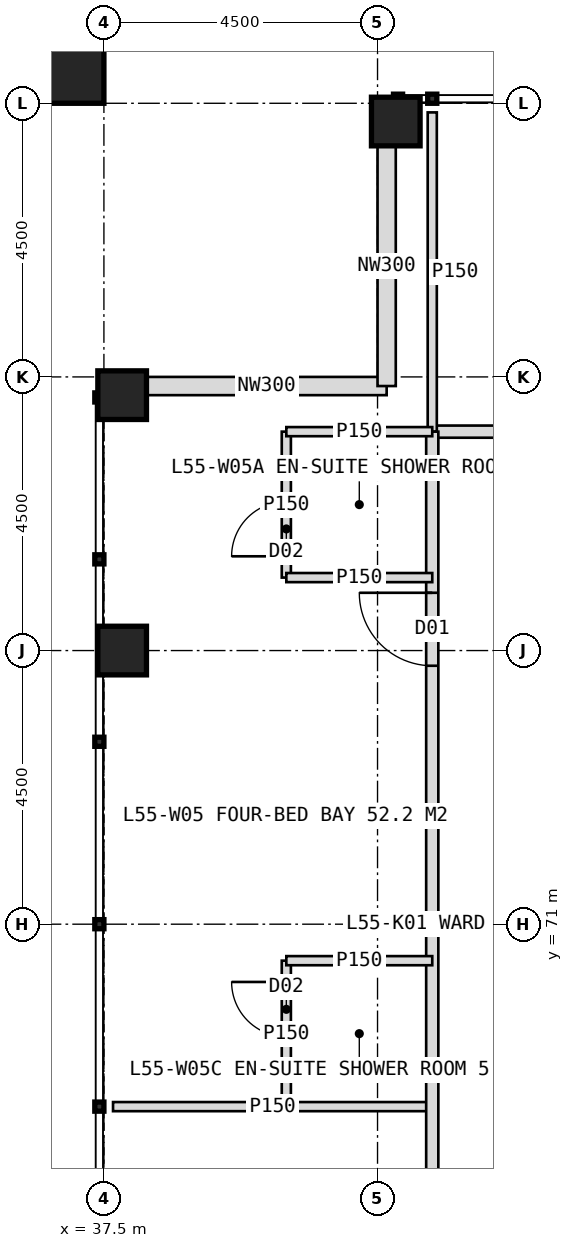
"""IFC4 building model, lengths in metres.
Left out: names, types, materials, properties, quantities, classifications, styles, units other than length and angle.
Written with IfcOpenShell. Run it as: python <this file> out.ifc"""

import sys

from ifc_helpers import new_model, si_unit, direction, frame, frame_2d, origin, origin_2d, place, context, subcontext, project, spatial, rectangle, hollow_rectangle, extrude, element, fill, save


model = new_model("IFC4")
c1 = context("Model", 3, precision=1e-05, world=origin(), true_north=direction((0.0, 1.0)))
c2 = subcontext(c1, "Body", "Model", "MODEL_VIEW")
j1 = project(units=[si_unit("LENGTHUNIT", "METRE"), si_unit("PLANEANGLEUNIT", "RADIAN")], contexts=[c1])
p1 = place(None, origin())
s1 = spatial("IfcSite", under=j1, at=p1, CompositionType="ELEMENT")
p2 = place(p1, origin())
s2 = spatial("IfcBuilding", under=s1, at=p2, CompositionType="ELEMENT")
p3 = place(p2, frame((0.0, 0.0, 229.0)))
s3 = spatial("IfcBuildingStorey", under=s2, at=p3, CompositionType="ELEMENT", Elevation=229.0)
for number, where, z_axis, x_axis in (
    (1, (42.3, 84.2, 0.0), (0.0, 0.0, 1.0), (1.0, 0.0, 0.0)),
    (2, (37.8, 75.5, 0.0), (0.0, 0.0, 1.0), (1.0, 0.0, 0.0)),
    (3, (37.8, 79.7, 0.0), (0.0, 0.0, 1.0), (1.0, 0.0, 0.0)),
):
    element("IfcColumn", number, at=place(p3, frame(where, z_axis=z_axis, x_axis=x_axis)), inside=s3, PredefinedType="COLUMN", context=c2, shape_type="SweptSolid", body=[
        extrude(hollow_rectangle(XDim=0.8, YDim=0.8, WallThickness=0.08, at=origin_2d()), origin(), (0.0, 0.0, 1.0), 4.0),
    ])
p4 = place(p3, frame((36.9, 85.1, 0.0), z_axis=(0.0, 0.0, 1.0), x_axis=(1.0, 0.0, 0.0)))
e4 = element("IfcColumn", 4, at=p4, inside=s3, PredefinedType="COLUMN", context=c2, shape_type="SweptSolid", body=[
    extrude(hollow_rectangle(XDim=1.2, YDim=1.2, WallThickness=0.07, at=origin_2d()), origin(), (0.0, 0.0, 1.0), 4.0),
])
for number, where, z_axis, x_axis in (
    (5, (38.2, 79.85, 0.0), (0.0, 0.0, 1.0), (1.0, 0.0, 0.0)),
    (6, (42.15, 79.85, 0.0), (0.0, 0.0, 1.0), (0.0, 1.0, 0.0)),
):
    element("IfcWall", number, at=place(p3, frame(where, z_axis=z_axis, x_axis=x_axis)), inside=s3, PredefinedType="ELEMENTEDWALL", context=c2, shape_type="SweptSolid", body=[
        extrude(rectangle(XDim=3.95, YDim=0.3, at=frame_2d((1.975, 0.0))), origin(), (0.0, 0.0, 1.0), 2.85),
    ])
p5 = place(p3, frame((42.9, 79.1, 0.0), z_axis=(0.0, 0.0, 1.0), x_axis=(1.0, 0.0, 0.0)))
e7 = element("IfcWall", 7, at=p5, inside=s3, PredefinedType="PARTITIONING", context=c2, shape_type="SweptSolid", body=[
    extrude(rectangle(XDim=34.2, YDim=0.2, at=frame_2d((17.1, 0.0))), origin(), (0.0, 0.0, 1.0), 3.75),
])
p6 = place(p5, frame((3.55, 0.0, 0.0)))
e8 = element("IfcOpeningElement", 8, at=p6, cuts=e7, PredefinedType="OPENING", context=c2, shape_type="SweptSolid", body=[
    extrude(rectangle(XDim=1.0, YDim=2.1, at=frame_2d((0.5, 1.05))), frame((0.0, 0.11, 0.0), z_axis=(0.0, -1.0, 0.0), x_axis=(1.0, 0.0, 0.0)), (0.0, 0.0, 1.0), 0.22),
])
p7 = place(p5, frame((10.75, 0.0, 0.0)))
e9 = element("IfcOpeningElement", 9, at=p7, cuts=e7, PredefinedType="OPENING", context=c2, shape_type="SweptSolid", body=[
    extrude(rectangle(XDim=1.2, YDim=2.2, at=frame_2d((0.6, 1.1))), frame((0.0, 0.11, 0.0), z_axis=(0.0, -1.0, 0.0), x_axis=(1.0, 0.0, 0.0)), (0.0, 0.0, 1.0), 0.22),
])
p8 = place(p5, frame((16.25, 0.0, 0.0)))
e10 = element("IfcOpeningElement", 10, at=p8, cuts=e7, PredefinedType="OPENING", context=c2, shape_type="SweptSolid", body=[
    extrude(rectangle(XDim=1.2, YDim=2.2, at=frame_2d((0.6, 1.1))), frame((0.0, 0.11, 0.0), z_axis=(0.0, -1.0, 0.0), x_axis=(1.0, 0.0, 0.0)), (0.0, 0.0, 1.0), 0.22),
])
p9 = place(p5, frame((22.75, 0.0, 0.0)))
e11 = element("IfcOpeningElement", 11, at=p9, cuts=e7, PredefinedType="OPENING", context=c2, shape_type="SweptSolid", body=[
    extrude(rectangle(XDim=1.2, YDim=2.2, at=frame_2d((0.6, 1.1))), frame((0.0, 0.11, 0.0), z_axis=(0.0, -1.0, 0.0), x_axis=(1.0, 0.0, 0.0)), (0.0, 0.0, 1.0), 0.22),
])
p10 = place(p5, frame((29.75, 0.0, 0.0)))
e12 = element("IfcOpeningElement", 12, at=p10, cuts=e7, PredefinedType="OPENING", context=c2, shape_type="SweptSolid", body=[
    extrude(rectangle(XDim=1.2, YDim=2.2, at=frame_2d((0.6, 1.1))), frame((0.0, 0.11, 0.0), z_axis=(0.0, -1.0, 0.0), x_axis=(1.0, 0.0, 0.0)), (0.0, 0.0, 1.0), 0.22),
])
for number, where, z_axis, x_axis in (
    (13, (42.9, 79.1, 0.0), (0.0, 0.0, 1.0), (0.0, 1.0, 0.0)),
    (14, (42.9, 68.0, 0.0), (0.0, 0.0, 1.0), (-1.0, 0.0, 0.0)),
):
    element("IfcWall", number, at=place(p3, frame(where, z_axis=z_axis, x_axis=x_axis)), inside=s3, PredefinedType="PARTITIONING", context=c2, shape_type="SweptSolid", body=[
        extrude(rectangle(XDim=5.25, YDim=0.15, at=frame_2d((2.625, 0.0))), origin(), (0.0, 0.0, 1.0), 3.75),
    ])
p11 = place(p3, frame((42.9, 44.9, 0.0), z_axis=(0.0, 0.0, 1.0), x_axis=(0.0, 1.0, 0.0)))
e15 = element("IfcWall", 15, at=p11, inside=s3, PredefinedType="PARTITIONING", context=c2, shape_type="SweptSolid", body=[
    extrude(rectangle(XDim=34.2, YDim=0.2, at=frame_2d((17.1, 0.0))), origin(), (0.0, 0.0, 1.0), 3.75),
])
p12 = place(p11, frame((1.25, 0.0, 0.0)))
e16 = element("IfcOpeningElement", 16, at=p12, cuts=e15, PredefinedType="OPENING", context=c2, shape_type="SweptSolid", body=[
    extrude(rectangle(XDim=1.2, YDim=2.2, at=frame_2d((0.6, 1.1))), frame((0.0, 0.11, 0.0), z_axis=(0.0, -1.0, 0.0), x_axis=(1.0, 0.0, 0.0)), (0.0, 0.0, 1.0), 0.22),
])
p13 = place(p11, frame((7.75, 0.0, 0.0)))
e17 = element("IfcOpeningElement", 17, at=p13, cuts=e15, PredefinedType="OPENING", context=c2, shape_type="SweptSolid", body=[
    extrude(rectangle(XDim=1.2, YDim=2.2, at=frame_2d((0.6, 1.1))), frame((0.0, 0.11, 0.0), z_axis=(0.0, -1.0, 0.0), x_axis=(1.0, 0.0, 0.0)), (0.0, 0.0, 1.0), 0.22),
])
p14 = place(p11, frame((13.6, 0.0, 0.0)))
e18 = element("IfcOpeningElement", 18, at=p14, cuts=e15, PredefinedType="OPENING", context=c2, shape_type="SweptSolid", body=[
    extrude(rectangle(XDim=1.0, YDim=2.1, at=frame_2d((0.5, 1.05))), frame((0.0, 0.11, 0.0), z_axis=(0.0, -1.0, 0.0), x_axis=(1.0, 0.0, 0.0)), (0.0, 0.0, 1.0), 0.22),
])
p15 = place(p11, frame((19.75, 0.0, 0.0)))
e19 = element("IfcOpeningElement", 19, at=p15, cuts=e15, PredefinedType="OPENING", context=c2, shape_type="SweptSolid", body=[
    extrude(rectangle(XDim=1.2, YDim=2.2, at=frame_2d((0.6, 1.1))), frame((0.0, 0.11, 0.0), z_axis=(0.0, -1.0, 0.0), x_axis=(1.0, 0.0, 0.0)), (0.0, 0.0, 1.0), 0.22),
])
p16 = place(p11, frame((30.35, 0.0, 0.0)))
e20 = element("IfcOpeningElement", 20, at=p16, cuts=e15, PredefinedType="OPENING", context=c2, shape_type="SweptSolid", body=[
    extrude(rectangle(XDim=1.2, YDim=2.2, at=frame_2d((0.6, 1.1))), frame((0.0, 0.11, 0.0), z_axis=(0.0, -1.0, 0.0), x_axis=(1.0, 0.0, 0.0)), (0.0, 0.0, 1.0), 0.22),
])
p17 = place(p3, frame((40.5, 76.7, 0.0), z_axis=(0.0, 0.0, 1.0), x_axis=(0.0, 1.0, 0.0)))
e21 = element("IfcWall", 21, at=p17, inside=s3, PredefinedType="PARTITIONING", context=c2, shape_type="SweptSolid", body=[
    extrude(rectangle(XDim=2.4, YDim=0.15, at=frame_2d((1.2, 0.0))), origin(), (0.0, 0.0, 1.0), 3.75),
])
p18 = place(p17, frame((0.35, 0.0, 0.0)))
e22 = element("IfcOpeningElement", 22, at=p18, cuts=e21, PredefinedType="OPENING", context=c2, shape_type="SweptSolid", body=[
    extrude(rectangle(XDim=0.9, YDim=2.1, at=frame_2d((0.45, 1.05))), frame((0.0, 0.085, 0.0), z_axis=(0.0, -1.0, 0.0), x_axis=(1.0, 0.0, 0.0)), (0.0, 0.0, 1.0), 0.17),
])
p19 = place(p3, frame((42.9, 76.7, 0.0), z_axis=(0.0, 0.0, 1.0), x_axis=(-1.0, 0.0, 0.0)))
e23 = element("IfcWall", 23, at=p19, inside=s3, PredefinedType="PARTITIONING", context=c2, shape_type="SweptSolid", body=[
    extrude(rectangle(XDim=2.4, YDim=0.15, at=frame_2d((1.2, 0.0))), origin(), (0.0, 0.0, 1.0), 3.75),
])
p20 = place(p3, frame((40.5, 68.0, 0.0), z_axis=(0.0, 0.0, 1.0), x_axis=(0.0, 1.0, 0.0)))
e24 = element("IfcWall", 24, at=p20, inside=s3, PredefinedType="PARTITIONING", context=c2, shape_type="SweptSolid", body=[
    extrude(rectangle(XDim=2.4, YDim=0.15, at=frame_2d((1.2, 0.0))), origin(), (0.0, 0.0, 1.0), 3.75),
])
p21 = place(p20, frame((1.15, 0.0, 0.0)))
e25 = element("IfcOpeningElement", 25, at=p21, cuts=e24, PredefinedType="OPENING", context=c2, shape_type="SweptSolid", body=[
    extrude(rectangle(XDim=0.9, YDim=2.1, at=frame_2d((0.45, 1.05))), frame((0.0, 0.085, 0.0), z_axis=(0.0, -1.0, 0.0), x_axis=(1.0, 0.0, 0.0)), (0.0, 0.0, 1.0), 0.17),
])
for number, where, z_axis, x_axis in (
    (26, (42.9, 70.4, 0.0), (0.0, 0.0, 1.0), (-1.0, 0.0, 0.0)),
    (27, (42.9, 79.1, 0.0), (0.0, 0.0, 1.0), (-1.0, 0.0, 0.0)),
):
    element("IfcWall", number, at=place(p3, frame(where, z_axis=z_axis, x_axis=x_axis)), inside=s3, PredefinedType="PARTITIONING", context=c2, shape_type="SweptSolid", body=[
        extrude(rectangle(XDim=2.4, YDim=0.15, at=frame_2d((1.2, 0.0))), origin(), (0.0, 0.0, 1.0), 3.75),
    ])
p22 = place(p16, origin())
e28 = element("IfcDoor", 28, at=p22, inside=s3, OperationType="SINGLE_SWING_RIGHT", PredefinedType="DOOR", context=c2, shape_type="SweptSolid", body=[
    extrude(rectangle(XDim=1.2, YDim=2.2, at=frame_2d((0.6, 1.1))), frame((0.0, 0.025, 0.0), z_axis=(0.0, -1.0, 0.0), x_axis=(1.0, 0.0, 0.0)), (0.0, 0.0, 1.0), 0.05),
])
fill(e20, e28)
p23 = place(p18, origin())
e29 = element("IfcDoor", 29, at=p23, inside=s3, OperationType="SINGLE_SWING_LEFT", PredefinedType="DOOR", context=c2, shape_type="SweptSolid", body=[
    extrude(rectangle(XDim=0.9, YDim=2.1, at=frame_2d((0.45, 1.05))), frame((0.0, 0.025, 0.0), z_axis=(0.0, -1.0, 0.0), x_axis=(1.0, 0.0, 0.0)), (0.0, 0.0, 1.0), 0.05),
])
fill(e22, e29)
p24 = place(p21, origin())
e30 = element("IfcDoor", 30, at=p24, inside=s3, OperationType="SINGLE_SWING_RIGHT", PredefinedType="DOOR", context=c2, shape_type="SweptSolid", body=[
    extrude(rectangle(XDim=0.9, YDim=2.1, at=frame_2d((0.45, 1.05))), frame((0.0, 0.025, 0.0), z_axis=(0.0, -1.0, 0.0), x_axis=(1.0, 0.0, 0.0)), (0.0, 0.0, 1.0), 0.05),
])
fill(e25, e30)
save(model, sys.argv[1])
